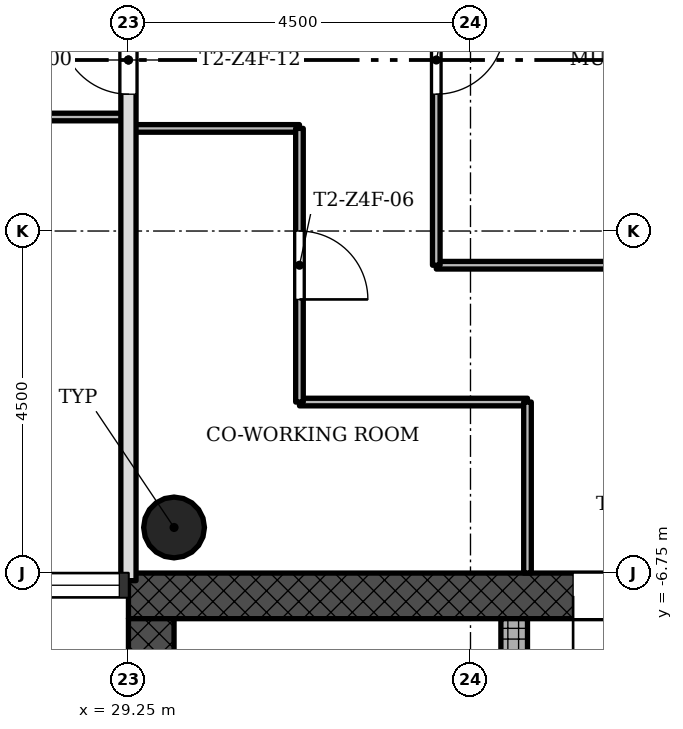
"""IFC4 building model, lengths in metres.
Left out: names, types, materials, properties, quantities, classifications, styles, units other than length and angle.
Written with IfcOpenShell. Run it as: python <this file> out.ifc"""

import sys

from ifc_helpers import new_model, si_unit, direction, frame, frame_2d, origin, origin_2d, place, context, subcontext, project, spatial, rectangle, hollow_circle, extrude, element, fill, save


model = new_model("IFC4")
c1 = context("Model", 3, precision=1e-05, world=origin(), true_north=direction((0.0, 1.0)))
c2 = subcontext(c1, "Body", "Model", "MODEL_VIEW")
j1 = project(units=[si_unit("LENGTHUNIT", "METRE"), si_unit("PLANEANGLEUNIT", "RADIAN")], contexts=[c1])
p1 = place(None, origin())
s1 = spatial("IfcSite", under=j1, at=p1, CompositionType="ELEMENT")
p2 = place(p1, origin())
s2 = spatial("IfcBuilding", under=s1, at=p2, CompositionType="ELEMENT")
p3 = place(p2, frame((0.0, 0.0, 223.2)))
s3 = spatial("IfcBuildingStorey", under=s2, at=p3, CompositionType="ELEMENT", Elevation=223.2)
p4 = place(p3, frame((42.15, -7.05, 0.0), z_axis=(0.0, 0.0, 1.0), x_axis=(-1.0, 0.0, 0.0)))
e1 = element("IfcWall", 1, at=p4, inside=s3, PredefinedType="SHEAR", context=c2, shape_type="SweptSolid", body=[
    extrude(rectangle(XDim=12.9, YDim=0.6, at=frame_2d((6.45, 0.0))), origin(), (0.0, 0.0, 1.0), 3.4),
])
p5 = place(p4, frame((5.25, 0.0, 0.0)))
e2 = element("IfcOpeningElement", 2, at=p5, cuts=e1, PredefinedType="OPENING", context=c2, shape_type="SweptSolid", body=[
    extrude(rectangle(XDim=1.8, YDim=2.1, at=frame_2d((0.9, 1.05))), frame((0.0, 0.31, 0.0), z_axis=(0.0, -1.0, 0.0), x_axis=(1.0, 0.0, 0.0)), (0.0, 0.0, 1.0), 0.62),
])
p6 = place(p3, frame((29.55, -7.35, 0.0), z_axis=(0.0, 0.0, 1.0), x_axis=(0.0, -1.0, 0.0)))
e3 = element("IfcWall", 3, at=p6, inside=s3, PredefinedType="SHEAR", context=c2, shape_type="SweptSolid", body=[
    extrude(rectangle(XDim=8.4, YDim=0.6, at=frame_2d((4.2, 0.0))), origin(), (0.0, 0.0, 1.0), 3.4),
])
p7 = place(p3, frame((34.325, -15.15, 0.0), z_axis=(0.0, 0.0, 1.0), x_axis=(0.0, 1.0, 0.0)))
e4 = element("IfcWall", 4, at=p7, inside=s3, PredefinedType="SHEAR", context=c2, shape_type="SweptSolid", body=[
    extrude(rectangle(XDim=7.8, YDim=0.35, at=frame_2d((3.9, 0.0))), origin(), (0.0, 0.0, 1.0), 3.4),
])
p8 = place(p7, frame((5.55, 0.0, 0.0)))
e5 = element("IfcOpeningElement", 5, at=p8, cuts=e4, PredefinedType="OPENING", context=c2, shape_type="SweptSolid", body=[
    extrude(rectangle(XDim=1.1, YDim=2.1, at=frame_2d((0.55, 1.05))), frame((0.0, 0.185, 0.0), z_axis=(0.0, -1.0, 0.0), x_axis=(1.0, 0.0, 0.0)), (0.0, 0.0, 1.0), 0.37),
])
p9 = place(p7, frame((1.2, 0.0, 0.0)))
e6 = element("IfcOpeningElement", 6, at=p9, cuts=e4, PredefinedType="OPENING", context=c2, shape_type="SweptSolid", body=[
    extrude(rectangle(XDim=1.1, YDim=2.1, at=frame_2d((0.55, 1.05))), frame((0.0, 0.185, 0.0), z_axis=(0.0, -1.0, 0.0), x_axis=(1.0, 0.0, 0.0)), (0.0, 0.0, 1.0), 0.37),
])
p10 = place(p7, frame((3.5, 0.0, 0.0)))
e7 = element("IfcOpeningElement", 7, at=p10, cuts=e4, PredefinedType="OPENING", context=c2, shape_type="SweptSolid", body=[
    extrude(rectangle(XDim=0.9, YDim=2.1, at=frame_2d((0.45, 1.05))), frame((0.0, 0.185, 0.0), z_axis=(0.0, -1.0, 0.0), x_axis=(1.0, 0.0, 0.0)), (0.0, 0.0, 1.0), 0.37),
])
p11 = place(p3, frame((29.85, -6.15, 0.0), z_axis=(0.0, 0.0, 1.0), x_axis=(1.0, 0.0, 0.0)))
e8 = element("IfcColumn", 8, at=p11, inside=s3, PredefinedType="COLUMN", context=c2, shape_type="SweptSolid", body=[
    extrude(hollow_circle(Radius=0.4, WallThickness=0.028, at=origin_2d()), origin(), (0.0, 0.0, 1.0), 3.4),
])
p12 = place(p3, frame((34.5, -4.5, 0.0), z_axis=(0.0, 0.0, 1.0), x_axis=(-1.0, 0.0, 0.0)))
e9 = element("IfcWall", 9, at=p12, inside=s3, PredefinedType="PARTITIONING", context=c2, shape_type="SweptSolid", body=[
    extrude(rectangle(XDim=3.0, YDim=0.1, at=frame_2d((1.5, 0.0))), origin(), (0.0, 0.0, 1.0), 3.0),
])
p13 = place(p3, frame((38.7, -2.7, 0.0), z_axis=(0.0, 0.0, 1.0), x_axis=(-1.0, 0.0, 0.0)))
e10 = element("IfcWall", 10, at=p13, inside=s3, PredefinedType="PARTITIONING", context=c2, shape_type="SweptSolid", body=[
    extrude(rectangle(XDim=5.4, YDim=0.1, at=frame_2d((2.7, 0.0))), origin(), (0.0, 0.0, 1.0), 3.0),
])
p14 = place(p3, frame((31.5, -0.9, 0.0), z_axis=(0.0, 0.0, 1.0), x_axis=(-1.0, 0.0, 0.0)))
e11 = element("IfcWall", 11, at=p14, inside=s3, PredefinedType="PARTITIONING", context=c2, shape_type="SweptSolid", body=[
    extrude(rectangle(XDim=2.25, YDim=0.1, at=frame_2d((1.125, 0.0))), origin(), (0.0, 0.0, 1.0), 3.0),
])
p15 = place(p3, frame((29.25, -0.75, 0.0), z_axis=(0.0, 0.0, 1.0), x_axis=(-1.0, 0.0, 0.0)))
e12 = element("IfcWall", 12, at=p15, inside=s3, PredefinedType="PARTITIONING", context=c2, shape_type="SweptSolid", body=[
    extrude(rectangle(XDim=7.8, YDim=0.1, at=frame_2d((3.9, 0.0))), origin(), (0.0, 0.0, 1.0), 3.0),
])
p16 = place(p15, frame((1.8, 0.0, 0.0)))
e13 = element("IfcOpeningElement", 13, at=p16, cuts=e12, PredefinedType="OPENING", context=c2, shape_type="SweptSolid", body=[
    extrude(rectangle(XDim=0.9, YDim=2.1, at=frame_2d((0.45, 1.05))), frame((0.0, 0.06, 0.0), z_axis=(0.0, -1.0, 0.0), x_axis=(1.0, 0.0, 0.0)), (0.0, 0.0, 1.0), 0.12),
])
p17 = place(p15, frame((4.95, 0.0, 0.0)))
e14 = element("IfcOpeningElement", 14, at=p17, cuts=e12, PredefinedType="OPENING", context=c2, shape_type="SweptSolid", body=[
    extrude(rectangle(XDim=0.9, YDim=2.1, at=frame_2d((0.45, 1.05))), frame((0.0, 0.06, 0.0), z_axis=(0.0, -1.0, 0.0), x_axis=(1.0, 0.0, 0.0)), (0.0, 0.0, 1.0), 0.12),
])
p18 = place(p15, frame((6.6, 0.0, 0.0)))
e15 = element("IfcOpeningElement", 15, at=p18, cuts=e12, PredefinedType="OPENING", context=c2, shape_type="SweptSolid", body=[
    extrude(rectangle(XDim=0.9, YDim=2.1, at=frame_2d((0.45, 1.05))), frame((0.0, 0.06, 0.0), z_axis=(0.0, -1.0, 0.0), x_axis=(1.0, 0.0, 0.0)), (0.0, 0.0, 1.0), 0.12),
])
p19 = place(p3, frame((34.5, -6.75, 0.0), z_axis=(0.0, 0.0, 1.0), x_axis=(0.0, 1.0, 0.0)))
e16 = element("IfcWall", 16, at=p19, inside=s3, PredefinedType="PARTITIONING", context=c2, shape_type="SweptSolid", body=[
    extrude(rectangle(XDim=2.25, YDim=0.1, at=frame_2d((1.125, 0.0))), origin(), (0.0, 0.0, 1.0), 3.0),
])
p20 = place(p3, frame((33.3, -2.7, 0.0), z_axis=(0.0, 0.0, 1.0), x_axis=(0.0, 1.0, 0.0)))
e17 = element("IfcWall", 17, at=p20, inside=s3, PredefinedType="PARTITIONING", context=c2, shape_type="SweptSolid", body=[
    extrude(rectangle(XDim=5.4, YDim=0.1, at=frame_2d((2.7, 0.0))), origin(), (0.0, 0.0, 1.0), 3.0),
])
p21 = place(p20, frame((2.25, 0.0, 0.0)))
e18 = element("IfcOpeningElement", 18, at=p21, cuts=e17, PredefinedType="OPENING", context=c2, shape_type="SweptSolid", body=[
    extrude(rectangle(XDim=0.9, YDim=2.1, at=frame_2d((0.45, 1.05))), frame((0.0, 0.06, 0.0), z_axis=(0.0, -1.0, 0.0), x_axis=(1.0, 0.0, 0.0)), (0.0, 0.0, 1.0), 0.12),
])
p22 = place(p3, frame((31.5, -4.5, 0.0), z_axis=(0.0, 0.0, 1.0), x_axis=(0.0, 1.0, 0.0)))
e19 = element("IfcWall", 19, at=p22, inside=s3, PredefinedType="PARTITIONING", context=c2, shape_type="SweptSolid", body=[
    extrude(rectangle(XDim=3.6, YDim=0.1, at=frame_2d((1.8, 0.0))), origin(), (0.0, 0.0, 1.0), 3.0),
])
p23 = place(p22, frame((1.35, 0.0, 0.0)))
e20 = element("IfcOpeningElement", 20, at=p23, cuts=e19, PredefinedType="OPENING", context=c2, shape_type="SweptSolid", body=[
    extrude(rectangle(XDim=0.9, YDim=2.1, at=frame_2d((0.45, 1.05))), frame((0.0, 0.06, 0.0), z_axis=(0.0, -1.0, 0.0), x_axis=(1.0, 0.0, 0.0)), (0.0, 0.0, 1.0), 0.12),
])
p24 = place(p3, frame((29.25, -6.85, 0.0), z_axis=(0.0, 0.0, 1.0), x_axis=(0.0, 1.0, 0.0)))
e21 = element("IfcWall", 21, at=p24, inside=s3, PredefinedType="SOLIDWALL", context=c2, shape_type="SweptSolid", body=[
    extrude(rectangle(XDim=13.7, YDim=0.2, at=frame_2d((6.85, 0.0))), origin(), (0.0, 0.0, 1.0), 3.0),
])
p25 = place(p24, frame((6.4, 0.0, 0.0)))
e22 = element("IfcOpeningElement", 22, at=p25, cuts=e21, PredefinedType="OPENING", context=c2, shape_type="SweptSolid", body=[
    extrude(rectangle(XDim=0.9, YDim=2.1, at=frame_2d((0.45, 1.05))), frame((0.0, 0.11, 0.0), z_axis=(0.0, -1.0, 0.0), x_axis=(1.0, 0.0, 0.0)), (0.0, 0.0, 1.0), 0.22),
])
p26 = place(p21, origin())
e23 = element("IfcDoor", 23, at=p26, inside=s3, OperationType="SINGLE_SWING_RIGHT", PredefinedType="DOOR", context=c2, shape_type="SweptSolid", body=[
    extrude(rectangle(XDim=0.9, YDim=2.1, at=frame_2d((0.45, 1.05))), frame((0.0, 0.025, 0.0), z_axis=(0.0, -1.0, 0.0), x_axis=(1.0, 0.0, 0.0)), (0.0, 0.0, 1.0), 0.05),
])
fill(e18, e23)
p27 = place(p23, origin())
e24 = element("IfcDoor", 24, at=p27, inside=s3, OperationType="SINGLE_SWING_LEFT", PredefinedType="DOOR", context=c2, shape_type="SweptSolid", body=[
    extrude(rectangle(XDim=0.9, YDim=2.1, at=frame_2d((0.45, 1.05))), frame((0.0, 0.025, 0.0), z_axis=(0.0, -1.0, 0.0), x_axis=(1.0, 0.0, 0.0)), (0.0, 0.0, 1.0), 0.05),
])
fill(e20, e24)
p28 = place(p25, origin())
e25 = element("IfcDoor", 25, at=p28, inside=s3, OperationType="SINGLE_SWING_LEFT", PredefinedType="DOOR", context=c2, shape_type="SweptSolid", body=[
    extrude(rectangle(XDim=0.9, YDim=2.1, at=frame_2d((0.45, 1.05))), frame((0.0, 0.025, 0.0), z_axis=(0.0, -1.0, 0.0), x_axis=(1.0, 0.0, 0.0)), (0.0, 0.0, 1.0), 0.05),
])
fill(e22, e25)
p29 = place(p5, origin())
e26 = element("IfcDoor", 26, at=p29, inside=s3, OperationType="SINGLE_SWING_LEFT", PredefinedType="DOOR", context=c2, shape_type="SweptSolid", body=[
    extrude(rectangle(XDim=1.8, YDim=2.1, at=frame_2d((0.9, 1.05))), frame((0.0, 0.025, 0.0), z_axis=(0.0, -1.0, 0.0), x_axis=(1.0, 0.0, 0.0)), (0.0, 0.0, 1.0), 0.05),
])
fill(e2, e26)
save(model, sys.argv[1])
